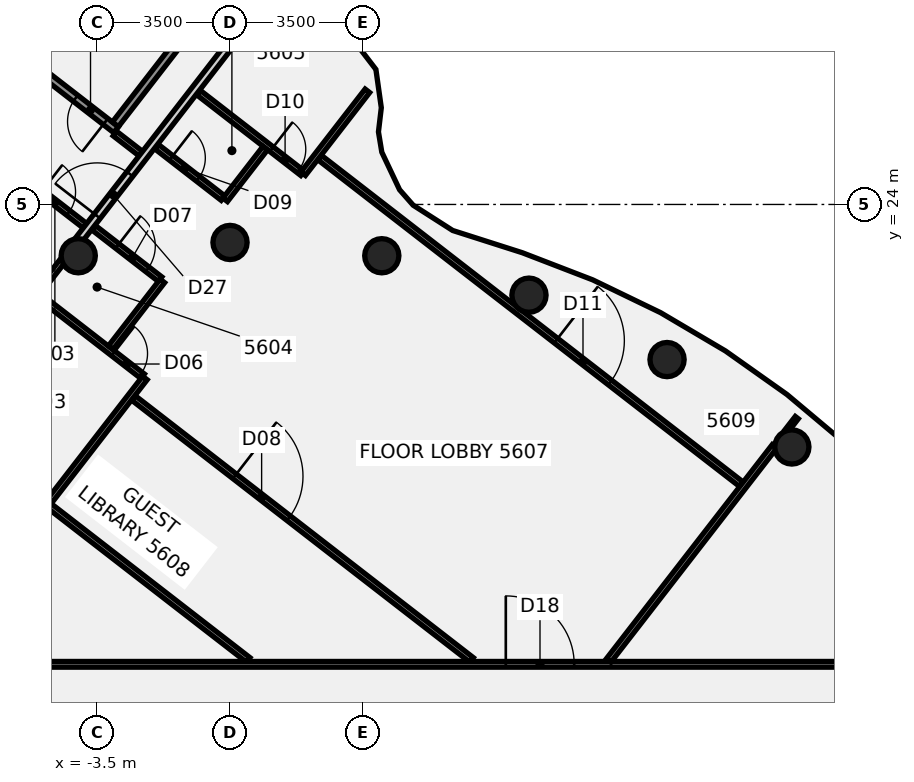
"""IFC4 building model, lengths in metres.
Left out: names, types, materials, properties, quantities, classifications, styles, units other than length and angle.
Written with IfcOpenShell. Run it as: python <this file> out.ifc"""

import sys

from ifc_helpers import new_model, si_unit, direction, frame, frame_2d, origin, origin_2d, place, context, subcontext, project, spatial, rectangle, circle, extrude, element, fill, save


model = new_model("IFC4")
c1 = context("Model", 3, precision=1e-05, world=origin(), true_north=direction((0.0, 1.0)))
c2 = subcontext(c1, "Body", "Model", "MODEL_VIEW")
j1 = project(units=[si_unit("LENGTHUNIT", "METRE"), si_unit("PLANEANGLEUNIT", "RADIAN")], contexts=[c1])
p1 = place(None, origin())
s1 = spatial("IfcSite", under=j1, at=p1, CompositionType="ELEMENT")
p2 = place(p1, origin())
s2 = spatial("IfcBuilding", under=s1, at=p2, CompositionType="ELEMENT")
p3 = place(p2, frame((0.0, 0.0, 223.5)))
s3 = spatial("IfcBuildingStorey", under=s2, at=p3, CompositionType="ELEMENT", Elevation=223.5)
for number, where, z_axis, x_axis in (
    (1, (14.784, 17.619, -0.14), (0.0, 0.0, 1.0), (1.0, 0.0, 0.0)),
    (2, (11.5, 19.919, -0.14), (0.0, 0.0, 1.0), (1.0, 0.0, 0.0)),
    (3, (7.866, 21.613, -0.14), (0.0, 0.0, 1.0), (1.0, 0.0, 0.0)),
    (4, (3.994, 22.651, -0.14), (0.0, 0.0, 1.0), (1.0, 0.0, 0.0)),
    (5, (0.0, 23.0, -0.14), (0.0, 0.0, 1.0), (1.0, 0.0, 0.0)),
    (6, (-3.994, 22.651, -0.14), (0.0, 0.0, 1.0), (1.0, 0.0, 0.0)),
):
    element("IfcColumn", number, at=place(p3, frame(where, z_axis=z_axis, x_axis=x_axis)), inside=s3, PredefinedType="COLUMN", context=c2, shape_type="SweptSolid", body=[
        extrude(circle(Radius=0.45, at=origin_2d()), origin(), (0.0, 0.0, 1.0), 3.6),
    ])
p4 = place(p3, frame((-12.868, 22.354, 0.0), z_axis=(0.0, 0.0, 1.0), x_axis=(0.790589551305, -0.61234643901, 0.0)))
e7 = element("IfcWall", 7, at=p4, inside=s3, PredefinedType="PARTITIONING", context=c2, shape_type="SweptSolid", body=[
    extrude(rectangle(XDim=16.882, YDim=0.15, at=frame_2d((8.441, 0.0))), origin(), (0.0, 0.0, 1.0), 2.864),
])
p5 = place(p3, frame((-10.791, 28.84, 0.0), z_axis=(0.0, 0.0, 1.0), x_axis=(0.790613040496, -0.612316111333, 0.0)))
e8 = element("IfcWall", 8, at=p5, inside=s3, PredefinedType="PARTITIONING", context=c2, shape_type="SweptSolid", body=[
    extrude(rectangle(XDim=8.82, YDim=0.15, at=frame_2d((4.41, 0.0))), origin(), (0.0, 0.0, 1.0), 2.864),
])
p6 = place(p5, frame((7.37, 0.0, 0.0)))
e9 = element("IfcOpeningElement", 9, at=p6, cuts=e8, PredefinedType="OPENING", context=c2, shape_type="SweptSolid", body=[
    extrude(rectangle(XDim=0.9, YDim=2.1, at=frame_2d((0.45, 1.05))), frame((0.0, 0.085, 0.0), z_axis=(0.0, -1.0, 0.0), x_axis=(1.0, 0.0, 0.0)), (0.0, 0.0, 1.0), 0.17),
])
p7 = place(p5, frame((0.82, 0.0, 0.0)))
e10 = element("IfcOpeningElement", 10, at=p7, cuts=e8, PredefinedType="OPENING", context=c2, shape_type="SweptSolid", body=[
    extrude(rectangle(XDim=0.9, YDim=2.1, at=frame_2d((0.45, 1.05))), frame((0.0, 0.085, 0.0), z_axis=(0.0, -1.0, 0.0), x_axis=(1.0, 0.0, 0.0)), (0.0, 0.0, 1.0), 0.17),
])
p8 = place(p3, frame((-3.029, 25.864, 0.0), z_axis=(0.0, 0.0, 1.0), x_axis=(0.79054207558, -0.612407729163, 0.0)))
e11 = element("IfcWall", 11, at=p8, inside=s3, PredefinedType="PARTITIONING", context=c2, shape_type="SweptSolid", body=[
    extrude(rectangle(XDim=0.861, YDim=0.15, at=frame_2d((0.43, 0.0))), origin(), (0.0, 0.0, 1.0), 2.864),
])
p9 = place(p3, frame((-5.023, 21.59, 0.0), z_axis=(0.0, 0.0, 1.0), x_axis=(0.790487958192, -0.612477581592, 0.0)))
e12 = element("IfcWall", 12, at=p9, inside=s3, PredefinedType="PARTITIONING", context=c2, shape_type="SweptSolid", body=[
    extrude(rectangle(XDim=3.445, YDim=0.15, at=frame_2d((1.723, 0.0))), origin(), (0.0, 0.0, 1.0), 2.864),
])
p10 = place(p9, frame((2.47, 0.0, 0.0)))
e13 = element("IfcOpeningElement", 13, at=p10, cuts=e12, PredefinedType="OPENING", context=c2, shape_type="SweptSolid", body=[
    extrude(rectangle(XDim=0.9, YDim=2.1, at=frame_2d((0.45, 1.05))), frame((0.0, 0.085, 0.0), z_axis=(0.0, -1.0, 0.0), x_axis=(1.0, 0.0, 0.0)), (0.0, 0.0, 1.0), 0.17),
])
p11 = place(p3, frame((-3.583, 23.384, 0.0), z_axis=(0.0, 0.0, 1.0), x_axis=(0.790792860223, -0.612083860447, 0.0)))
e14 = element("IfcWall", 14, at=p11, inside=s3, PredefinedType="PARTITIONING", context=c2, shape_type="SweptSolid", body=[
    extrude(rectangle(XDim=2.205, YDim=0.15, at=frame_2d((1.103, 0.0))), origin(), (0.0, 0.0, 1.0), 2.864),
])
p12 = place(p11, frame((0.78, 0.0, 0.0)))
e15 = element("IfcOpeningElement", 15, at=p12, cuts=e14, PredefinedType="OPENING", context=c2, shape_type="SweptSolid", body=[
    extrude(rectangle(XDim=1.0, YDim=2.1, at=frame_2d((0.5, 1.05))), frame((0.0, 0.085, 0.0), z_axis=(0.0, -1.0, 0.0), x_axis=(1.0, 0.0, 0.0)), (0.0, 0.0, 1.0), 0.17),
])
p13 = place(p3, frame((-2.544, 18.911, 0.0), z_axis=(0.0, 0.0, 1.0), x_axis=(0.790555726882, -0.612390106626, 0.0)))
e16 = element("IfcWall", 16, at=p13, inside=s3, PredefinedType="PARTITIONING", context=c2, shape_type="SweptSolid", body=[
    extrude(rectangle(XDim=11.258, YDim=0.15, at=frame_2d((5.629, 0.0))), origin(), (0.0, 0.0, 1.0), 2.864),
])
p14 = place(p13, frame((3.37, 0.0, 0.0)))
e17 = element("IfcOpeningElement", 17, at=p14, cuts=e16, PredefinedType="OPENING", context=c2, shape_type="SweptSolid", body=[
    extrude(rectangle(XDim=1.8, YDim=2.1, at=frame_2d((0.9, 1.05))), frame((0.0, 0.085, 0.0), z_axis=(0.0, -1.0, 0.0), x_axis=(1.0, 0.0, 0.0)), (0.0, 0.0, 1.0), 0.17),
])
p15 = place(p3, frame((-1.929, 25.519, 0.0), z_axis=(0.0, 0.0, 1.0), x_axis=(0.790453918324, -0.61252151228, 0.0)))
e18 = element("IfcWall", 18, at=p15, inside=s3, PredefinedType="PARTITIONING", context=c2, shape_type="SweptSolid", body=[
    extrude(rectangle(XDim=2.205, YDim=0.15, at=frame_2d((1.103, 0.0))), origin(), (0.0, 0.0, 1.0), 2.864),
])
p16 = place(p15, frame((0.48, 0.0, 0.0)))
e19 = element("IfcOpeningElement", 19, at=p16, cuts=e18, PredefinedType="OPENING", context=c2, shape_type="SweptSolid", body=[
    extrude(rectangle(XDim=0.9, YDim=2.1, at=frame_2d((0.45, 1.05))), frame((0.0, 0.085, 0.0), z_axis=(0.0, -1.0, 0.0), x_axis=(1.0, 0.0, 0.0)), (0.0, 0.0, 1.0), 0.17),
])
p17 = place(p3, frame((-0.827, 26.941, 0.0), z_axis=(0.0, 0.0, 1.0), x_axis=(0.790460316184, -0.612513255806, 0.0)))
e20 = element("IfcWall", 20, at=p17, inside=s3, PredefinedType="PARTITIONING", context=c2, shape_type="SweptSolid", body=[
    extrude(rectangle(XDim=3.46, YDim=0.15, at=frame_2d((1.73, 0.0))), origin(), (0.0, 0.0, 1.0), 2.864),
])
p18 = place(p17, frame((2.43, 0.0, 0.0)))
e21 = element("IfcOpeningElement", 21, at=p18, cuts=e20, PredefinedType="OPENING", context=c2, shape_type="SweptSolid", body=[
    extrude(rectangle(XDim=0.9, YDim=2.1, at=frame_2d((0.45, 1.05))), frame((0.0, 0.085, 0.0), z_axis=(0.0, -1.0, 0.0), x_axis=(1.0, 0.0, 0.0)), (0.0, 0.0, 1.0), 0.17),
])
p19 = place(p3, frame((2.355, 25.236, 0.0), z_axis=(0.0, 0.0, 1.0), x_axis=(0.790554792129, -0.612391313329, 0.0)))
e22 = element("IfcWall", 22, at=p19, inside=s3, PredefinedType="PARTITIONING", context=c2, shape_type="SweptSolid", body=[
    extrude(rectangle(XDim=14.04, YDim=0.15, at=frame_2d((7.02, 0.0))), origin(), (0.0, 0.0, 1.0), 2.864),
])
p20 = place(p19, frame((7.87, 0.0, 0.0)))
e23 = element("IfcOpeningElement", 23, at=p20, cuts=e22, PredefinedType="OPENING", context=c2, shape_type="SweptSolid", body=[
    extrude(rectangle(XDim=1.8, YDim=2.1, at=frame_2d((0.9, 1.05))), frame((0.0, 0.085, 0.0), z_axis=(0.0, -1.0, 0.0), x_axis=(1.0, 0.0, 0.0)), (0.0, 0.0, 1.0), 0.17),
])
p21 = place(p3, frame((-17.065, 11.9, 0.0), z_axis=(0.0, 0.0, 1.0), x_axis=(1.0, 0.0, 0.0)))
e24 = element("IfcWall", 24, at=p21, inside=s3, PredefinedType="PARTITIONING", context=c2, shape_type="SweptSolid", body=[
    extrude(rectangle(XDim=34.165, YDim=0.15, at=frame_2d((17.083, 0.0))), origin(), (0.0, 0.0, 1.0), 2.864),
])
p22 = place(p21, frame((24.322, 0.0, 0.0)))
e25 = element("IfcOpeningElement", 25, at=p22, cuts=e24, PredefinedType="OPENING", context=c2, shape_type="SweptSolid", body=[
    extrude(rectangle(XDim=1.8, YDim=2.1, at=frame_2d((0.9, 1.05))), frame((0.0, 0.085, 0.0), z_axis=(0.0, -1.0, 0.0), x_axis=(1.0, 0.0, 0.0)), (0.0, 0.0, 1.0), 0.17),
])
p23 = place(p21, frame((9.164, 0.0, 0.0)))
e26 = element("IfcOpeningElement", 26, at=p23, cuts=e24, PredefinedType="OPENING", context=c2, shape_type="SweptSolid", body=[
    extrude(rectangle(XDim=1.8, YDim=2.1, at=frame_2d((0.9, 1.05))), frame((0.0, 0.085, 0.0), z_axis=(0.0, -1.0, 0.0), x_axis=(1.0, 0.0, 0.0)), (0.0, 0.0, 1.0), 0.17),
])
p24 = place(p21, frame((2.714, 0.0, 0.0)))
e27 = element("IfcOpeningElement", 27, at=p24, cuts=e24, PredefinedType="OPENING", context=c2, shape_type="SweptSolid", body=[
    extrude(rectangle(XDim=1.8, YDim=2.1, at=frame_2d((0.9, 1.05))), frame((0.0, 0.085, 0.0), z_axis=(0.0, -1.0, 0.0), x_axis=(1.0, 0.0, 0.0)), (0.0, 0.0, 1.0), 0.17),
])
p25 = place(p3, frame((-7.609, 18.382, 0.0), z_axis=(0.0, 0.0, 1.0), x_axis=(0.612374115558, 0.790568113823, 0.0)))
e28 = element("IfcWall", 28, at=p25, inside=s3, PredefinedType="PARTITIONING", context=c2, shape_type="SweptSolid", body=[
    extrude(rectangle(XDim=5.367, YDim=0.15, at=frame_2d((2.683, 0.0))), origin(), (0.0, 0.0, 1.0), 2.864),
])
p26 = place(p3, frame((-4.047, 22.98, 0.0), z_axis=(0.0, 0.0, 1.0), x_axis=(0.612446849715, 0.790511768587, 0.0)))
e29 = element("IfcWall", 29, at=p26, inside=s3, PredefinedType="PARTITIONING", context=c2, shape_type="SweptSolid", body=[
    extrude(rectangle(XDim=8.402, YDim=0.2, at=frame_2d((4.201, 0.0))), origin(), (0.0, 0.0, 1.0), 2.864),
])
p27 = place(p26, frame((0.903, 0.0, 0.0)))
e30 = element("IfcOpeningElement", 30, at=p27, cuts=e29, PredefinedType="OPENING", context=c2, shape_type="SweptSolid", body=[
    extrude(rectangle(XDim=1.4, YDim=2.1, at=frame_2d((0.7, 1.05))), frame((0.0, 0.11, 0.0), z_axis=(0.0, -1.0, 0.0), x_axis=(1.0, 0.0, 0.0)), (0.0, 0.0, 1.0), 0.22),
])
p28 = place(p3, frame((-4.763, 16.177, 0.0), z_axis=(0.0, 0.0, 1.0), x_axis=(0.612470769592, 0.790493236148, 0.0)))
e31 = element("IfcWall", 31, at=p28, inside=s3, PredefinedType="PARTITIONING", context=c2, shape_type="SweptSolid", body=[
    extrude(rectangle(XDim=4.12, YDim=0.15, at=frame_2d((2.06, 0.0))), origin(), (0.0, 0.0, 1.0), 2.864),
])
p29 = place(p3, frame((1.925, 24.809, 0.0), z_axis=(0.0, 0.0, 1.0), x_axis=(0.612512234209, 0.7904611078, 0.0)))
e32 = element("IfcWall", 32, at=p29, inside=s3, PredefinedType="PARTITIONING", context=c2, shape_type="SweptSolid", body=[
    extrude(rectangle(XDim=2.759, YDim=0.15, at=frame_2d((1.379, 0.0))), origin(), (0.0, 0.0, 1.0), 2.864),
])
p30 = place(p3, frame((-3.14, 20.232, 0.0), z_axis=(0.0, 0.0, 1.0), x_axis=(0.612310650006, 0.790617270169, 0.0)))
e33 = element("IfcWall", 33, at=p30, inside=s3, PredefinedType="PARTITIONING", context=c2, shape_type="SweptSolid", body=[
    extrude(rectangle(XDim=2.221, YDim=0.15, at=frame_2d((1.11, 0.0))), origin(), (0.0, 0.0, 1.0), 2.864),
])
p31 = place(p3, frame((-0.127, 24.122, 0.0), z_axis=(0.0, 0.0, 1.0), x_axis=(0.612396492362, 0.790550780243, 0.0)))
e34 = element("IfcWall", 34, at=p31, inside=s3, PredefinedType="PARTITIONING", context=c2, shape_type="SweptSolid", body=[
    extrude(rectangle(XDim=1.72, YDim=0.15, at=frame_2d((0.86, 0.0))), origin(), (0.0, 0.0, 1.0), 2.864),
])
p32 = place(p3, frame((9.965, 12.003, 0.0), z_axis=(0.0, 0.0, 1.0), x_axis=(0.612459269892, 0.790502145933, 0.0)))
e35 = element("IfcWall", 35, at=p32, inside=s3, PredefinedType="PARTITIONING", context=c2, shape_type="SweptSolid", body=[
    extrude(rectangle(XDim=7.125, YDim=0.15, at=frame_2d((3.562, 0.0))), origin(), (0.0, 0.0, 1.0), 2.864),
])
p33 = place(p3, frame((14.643, 18.041, 0.0), z_axis=(0.0, 0.0, 1.0), x_axis=(0.612217769342, 0.790689194881, 0.0)))
e36 = element("IfcWall", 36, at=p33, inside=s3, PredefinedType="PARTITIONING", context=c2, shape_type="SweptSolid", body=[
    extrude(rectangle(XDim=0.442, YDim=0.1, at=frame_2d((0.221, 0.0))), origin(), (0.0, 0.0, 1.0), 2.864),
])
p34 = place(p3, frame((-2.999, 25.967, -0.14), z_axis=(0.0, 0.0, 1.0), x_axis=(-0.790580869813, 0.612357647364, 0.0)))
e37 = element("IfcWall", 37, at=p34, inside=s3, PredefinedType="SHEAR", context=c2, shape_type="SweptSolid", body=[
    extrude(rectangle(XDim=6.7, YDim=0.2, at=frame_2d((3.35, 0.0))), origin(), (0.0, 0.0, 1.0), 3.004),
])
p35 = place(p34, frame((0.35, 0.0, 0.0)))
e38 = element("IfcOpeningElement", 38, at=p35, cuts=e37, PredefinedType="OPENING", context=c2, shape_type="SweptSolid", body=[
    extrude(rectangle(XDim=1.0, YDim=2.1, at=frame_2d((0.5, 1.05))), frame((0.0, 0.11, 0.0), z_axis=(0.0, -1.0, 0.0), x_axis=(1.0, 0.0, 0.0)), (0.0, 0.0, 1.0), 0.22),
])
p36 = place(p3, frame((-1.057, 28.637, -0.14), z_axis=(0.0, 0.0, 1.0), x_axis=(-0.612402442808, -0.790546170721, 0.0)))
e39 = element("IfcWall", 39, at=p36, inside=s3, PredefinedType="SHEAR", context=c2, shape_type="SweptSolid", body=[
    extrude(rectangle(XDim=3.2, YDim=0.2, at=frame_2d((1.6, 0.0))), origin(), (0.0, 0.0, 1.0), 3.6),
])
p37 = place(p6, frame((0.9, 0.0, 0.0), z_axis=(0.0, 0.0, 1.0), x_axis=(-1.0, 0.0, 0.0)))
e40 = element("IfcDoor", 40, at=p37, inside=s3, OperationType="SINGLE_SWING_RIGHT", PredefinedType="DOOR", context=c2, shape_type="SweptSolid", body=[
    extrude(rectangle(XDim=0.9, YDim=2.1, at=frame_2d((0.45, 1.05))), frame((0.0, 0.025, 0.0), z_axis=(0.0, -1.0, 0.0), x_axis=(1.0, 0.0, 0.0)), (0.0, 0.0, 1.0), 0.05),
])
fill(e9, e40)
p38 = place(p10, frame((0.9, 0.0, 0.0), z_axis=(0.0, 0.0, 1.0), x_axis=(-1.0, 0.0, 0.0)))
e41 = element("IfcDoor", 41, at=p38, inside=s3, OperationType="SINGLE_SWING_RIGHT", PredefinedType="DOOR", context=c2, shape_type="SweptSolid", body=[
    extrude(rectangle(XDim=0.9, YDim=2.1, at=frame_2d((0.45, 1.05))), frame((0.0, 0.025, 0.0), z_axis=(0.0, -1.0, 0.0), x_axis=(1.0, 0.0, 0.0)), (0.0, 0.0, 1.0), 0.05),
])
fill(e13, e41)
p39 = place(p12, frame((1.0, 0.0, 0.0), z_axis=(0.0, 0.0, 1.0), x_axis=(-1.0, 0.0, 0.0)))
e42 = element("IfcDoor", 42, at=p39, inside=s3, OperationType="SINGLE_SWING_RIGHT", PredefinedType="DOOR", context=c2, shape_type="SweptSolid", body=[
    extrude(rectangle(XDim=1.0, YDim=2.1, at=frame_2d((0.5, 1.05))), frame((0.0, 0.025, 0.0), z_axis=(0.0, -1.0, 0.0), x_axis=(1.0, 0.0, 0.0)), (0.0, 0.0, 1.0), 0.05),
])
fill(e15, e42)
p40 = place(p14, frame((1.8, 0.0, 0.0), z_axis=(0.0, 0.0, 1.0), x_axis=(-1.0, 0.0, 0.0)))
e43 = element("IfcDoor", 43, at=p40, inside=s3, OperationType="DOUBLE_DOOR_SINGLE_SWING", PredefinedType="DOOR", context=c2, shape_type="SweptSolid", body=[
    extrude(rectangle(XDim=1.8, YDim=2.1, at=frame_2d((0.9, 1.05))), frame((0.0, 0.025, 0.0), z_axis=(0.0, -1.0, 0.0), x_axis=(1.0, 0.0, 0.0)), (0.0, 0.0, 1.0), 0.05),
])
fill(e17, e43)
p41 = place(p16, origin())
e44 = element("IfcDoor", 44, at=p41, inside=s3, OperationType="SINGLE_SWING_RIGHT", PredefinedType="DOOR", context=c2, shape_type="SweptSolid", body=[
    extrude(rectangle(XDim=0.9, YDim=2.1, at=frame_2d((0.45, 1.05))), frame((0.0, 0.025, 0.0), z_axis=(0.0, -1.0, 0.0), x_axis=(1.0, 0.0, 0.0)), (0.0, 0.0, 1.0), 0.05),
])
fill(e19, e44)
p42 = place(p18, origin())
e45 = element("IfcDoor", 45, at=p42, inside=s3, OperationType="SINGLE_SWING_LEFT", PredefinedType="DOOR", context=c2, shape_type="SweptSolid", body=[
    extrude(rectangle(XDim=0.9, YDim=2.1, at=frame_2d((0.45, 1.05))), frame((0.0, 0.025, 0.0), z_axis=(0.0, -1.0, 0.0), x_axis=(1.0, 0.0, 0.0)), (0.0, 0.0, 1.0), 0.05),
])
fill(e21, e45)
p43 = place(p20, origin())
e46 = element("IfcDoor", 46, at=p43, inside=s3, OperationType="DOUBLE_DOOR_SINGLE_SWING", PredefinedType="DOOR", context=c2, shape_type="SweptSolid", body=[
    extrude(rectangle(XDim=1.8, YDim=2.1, at=frame_2d((0.9, 1.05))), frame((0.0, 0.025, 0.0), z_axis=(0.0, -1.0, 0.0), x_axis=(1.0, 0.0, 0.0)), (0.0, 0.0, 1.0), 0.05),
])
fill(e23, e46)
p44 = place(p22, frame((1.8, 0.0, 0.0), z_axis=(0.0, 0.0, 1.0), x_axis=(-1.0, 0.0, 0.0)))
e47 = element("IfcDoor", 47, at=p44, inside=s3, OperationType="DOUBLE_DOOR_SINGLE_SWING", PredefinedType="DOOR", context=c2, shape_type="SweptSolid", body=[
    extrude(rectangle(XDim=1.8, YDim=2.1, at=frame_2d((0.9, 1.05))), frame((0.0, 0.025, 0.0), z_axis=(0.0, -1.0, 0.0), x_axis=(1.0, 0.0, 0.0)), (0.0, 0.0, 1.0), 0.05),
])
fill(e25, e47)
p45 = place(p27, frame((1.4, 0.0, 0.0), z_axis=(0.0, 0.0, 1.0), x_axis=(-1.0, 0.0, 0.0)))
e48 = element("IfcDoor", 48, at=p45, inside=s3, OperationType="DOUBLE_DOOR_SINGLE_SWING", PredefinedType="DOOR", context=c2, shape_type="SweptSolid", body=[
    extrude(rectangle(XDim=1.4, YDim=2.1, at=frame_2d((0.7, 1.05))), frame((0.0, 0.025, 0.0), z_axis=(0.0, -1.0, 0.0), x_axis=(1.0, 0.0, 0.0)), (0.0, 0.0, 1.0), 0.05),
])
fill(e30, e48)
p46 = place(p35, origin())
e49 = element("IfcDoor", 49, at=p46, inside=s3, OperationType="SINGLE_SWING_LEFT", PredefinedType="DOOR", context=c2, shape_type="SweptSolid", body=[
    extrude(rectangle(XDim=1.0, YDim=2.1, at=frame_2d((0.5, 1.05))), frame((0.0, 0.025, 0.0), z_axis=(0.0, -1.0, 0.0), x_axis=(1.0, 0.0, 0.0)), (0.0, 0.0, 1.0), 0.05),
])
fill(e38, e49)
save(model, sys.argv[1])
